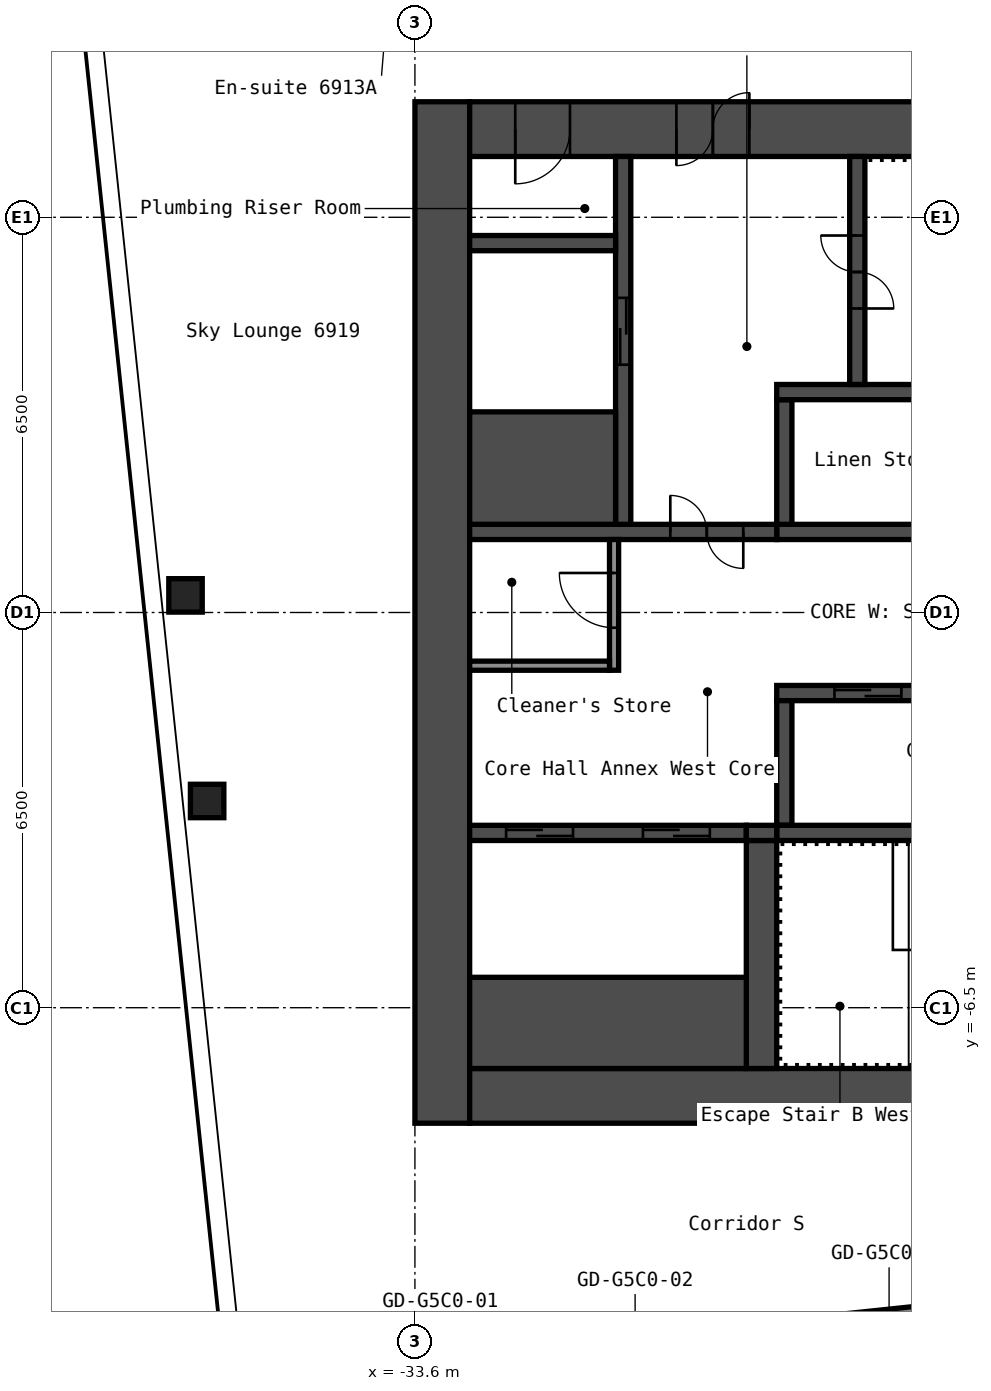
"""IFC4 building model, lengths in metres.
Left out: names, types, materials, properties, quantities, classifications, styles, units other than length and angle.
Written with IfcOpenShell. Run it as: python <this file> out.ifc"""

import sys

from ifc_helpers import new_model, si_unit, direction, frame, frame_2d, origin, origin_2d, place, context, subcontext, project, spatial, rectangle, hollow_rectangle, extrude, element, fill, save


model = new_model("IFC4")
c1 = context("Model", 3, precision=1e-05, world=origin(), true_north=direction((0.0, 1.0)))
c2 = subcontext(c1, "Body", "Model", "MODEL_VIEW")
j1 = project(units=[si_unit("LENGTHUNIT", "METRE"), si_unit("PLANEANGLEUNIT", "RADIAN")], contexts=[c1])
p1 = place(None, origin())
s1 = spatial("IfcSite", under=j1, at=p1, CompositionType="ELEMENT")
p2 = place(p1, origin())
s2 = spatial("IfcBuilding", under=s1, at=p2, CompositionType="ELEMENT")
p3 = place(p2, frame((0.0, 0.0, 245.4)))
s3 = spatial("IfcBuildingStorey", under=s2, at=p3, CompositionType="ELEMENT", Elevation=245.4)
for number, where, z_axis, x_axis in (
    (1, (-37.017, -3.1, 0.0), (0.0, 0.0, 1.0), (1.0, 0.0, 0.0)),
    (2, (-37.373, 0.281, 0.0), (0.0, 0.0, 1.0), (1.0, 0.0, 0.0)),
):
    element("IfcColumn", number, at=place(p3, frame(where, z_axis=z_axis, x_axis=x_axis)), inside=s3, PredefinedType="COLUMN", context=c2, shape_type="SweptSolid", body=[
        extrude(hollow_rectangle(XDim=0.55, YDim=0.55, WallThickness=0.022, InnerFilletRadius=0.033, OuterFilletRadius=0.055, at=origin_2d()), origin(), (0.0, 0.0, 1.0), 2.75),
    ])
p4 = place(p3, frame((-33.15, -8.4, 0.0), z_axis=(0.0, 0.0, 1.0), x_axis=(0.0, 1.0, 0.0)))
e3 = element("IfcWall", 3, at=p4, inside=s3, PredefinedType="SHEAR", context=c2, shape_type="SweptSolid", body=[
    extrude(rectangle(XDim=16.8, YDim=0.9, at=frame_2d((8.4, 0.0))), origin(), (0.0, 0.0, 1.0), 2.75),
])
p5 = place(p3, frame((-32.7, 7.95, 0.0), z_axis=(0.0, 0.0, 1.0), x_axis=(1.0, 0.0, 0.0)))
e4 = element("IfcWall", 4, at=p5, inside=s3, PredefinedType="SHEAR", context=c2, shape_type="SweptSolid", body=[
    extrude(rectangle(XDim=15.0, YDim=0.9, at=frame_2d((7.5, 0.0))), origin(), (0.0, 0.0, 1.0), 2.75),
])
p6 = place(p5, frame((3.4, 0.0, 0.0)))
e5 = element("IfcOpeningElement", 5, at=p6, cuts=e4, PredefinedType="OPENING", context=c2, shape_type="SweptSolid", body=[
    extrude(rectangle(XDim=1.2, YDim=2.1, at=frame_2d((0.6, 1.05))), frame((0.0, 0.46, 0.0), z_axis=(0.0, -1.0, 0.0), x_axis=(1.0, 0.0, 0.0)), (0.0, 0.0, 1.0), 0.92),
])
p7 = place(p5, frame((0.75, 0.0, 0.0)))
e6 = element("IfcOpeningElement", 6, at=p7, cuts=e4, PredefinedType="OPENING", context=c2, shape_type="SweptSolid", body=[
    extrude(rectangle(XDim=0.9, YDim=2.1, at=frame_2d((0.45, 1.05))), frame((0.0, 0.46, 0.0), z_axis=(0.0, -1.0, 0.0), x_axis=(1.0, 0.0, 0.0)), (0.0, 0.0, 1.0), 0.92),
])
p8 = place(p3, frame((-32.7, -7.95, 0.0), z_axis=(0.0, 0.0, 1.0), x_axis=(1.0, 0.0, 0.0)))
e7 = element("IfcWall", 7, at=p8, inside=s3, PredefinedType="SHEAR", context=c2, shape_type="SweptSolid", body=[
    extrude(rectangle(XDim=15.0, YDim=0.9, at=frame_2d((7.5, 0.0))), origin(), (0.0, 0.0, 1.0), 2.75),
])
p9 = place(p8, frame((11.45, 0.0, 0.0)))
e8 = element("IfcOpeningElement", 8, at=p9, cuts=e7, PredefinedType="OPENING", context=c2, shape_type="SweptSolid", body=[
    extrude(rectangle(XDim=1.0, YDim=2.1, at=frame_2d((0.5, 1.05))), frame((0.0, 0.46, 0.0), z_axis=(0.0, -1.0, 0.0), x_axis=(1.0, 0.0, 0.0)), (0.0, 0.0, 1.0), 0.92),
])
p10 = place(p3, frame((-27.65, 1.325, 0.0), z_axis=(0.0, 0.0, 1.0), x_axis=(1.0, 0.0, 0.0)))
e9 = element("IfcWall", 9, at=p10, inside=s3, PredefinedType="SHEAR", context=c2, shape_type="SweptSolid", body=[
    extrude(rectangle(XDim=7.5, YDim=0.25, at=frame_2d((3.75, 0.0))), origin(), (0.0, 0.0, 1.0), 2.75),
])
p11 = place(p10, frame((6.212, 0.0, 0.0)))
e10 = element("IfcOpeningElement", 10, at=p11, cuts=e9, PredefinedType="OPENING", context=c2, shape_type="SweptSolid", body=[
    extrude(rectangle(XDim=0.9, YDim=2.1, at=frame_2d((0.45, 1.05))), frame((0.0, 0.135, 0.0), z_axis=(0.0, -1.0, 0.0), x_axis=(1.0, 0.0, 0.0)), (0.0, 0.0, 1.0), 0.27),
])
p12 = place(p10, frame((2.512, 0.0, 0.0)))
e11 = element("IfcOpeningElement", 11, at=p12, cuts=e9, PredefinedType="OPENING", context=c2, shape_type="SweptSolid", body=[
    extrude(rectangle(XDim=0.9, YDim=2.1, at=frame_2d((0.45, 1.05))), frame((0.0, 0.135, 0.0), z_axis=(0.0, -1.0, 0.0), x_axis=(1.0, 0.0, 0.0)), (0.0, 0.0, 1.0), 0.27),
])
p13 = place(p3, frame((-27.525, 1.45, 0.0), z_axis=(0.0, 0.0, 1.0), x_axis=(0.0, 1.0, 0.0)))
e12 = element("IfcWall", 12, at=p13, inside=s3, PredefinedType="SHEAR", context=c2, shape_type="SweptSolid", body=[
    extrude(rectangle(XDim=2.05, YDim=0.25, at=frame_2d((1.025, 0.0))), origin(), (0.0, 0.0, 1.0), 2.75),
])
p14 = place(p3, frame((-27.65, 3.625, 0.0), z_axis=(0.0, 0.0, 1.0), x_axis=(1.0, 0.0, 0.0)))
e13 = element("IfcWall", 13, at=p14, inside=s3, PredefinedType="SHEAR", context=c2, shape_type="SweptSolid", body=[
    extrude(rectangle(XDim=7.5, YDim=0.25, at=frame_2d((3.75, 0.0))), origin(), (0.0, 0.0, 1.0), 2.75),
])
p15 = place(p3, frame((-26.325, 3.75, 0.0), z_axis=(0.0, 0.0, 1.0), x_axis=(0.0, 1.0, 0.0)))
e14 = element("IfcWall", 14, at=p15, inside=s3, PredefinedType="SHEAR", context=c2, shape_type="SweptSolid", body=[
    extrude(rectangle(XDim=3.75, YDim=0.25, at=frame_2d((1.875, 0.0))), origin(), (0.0, 0.0, 1.0), 2.75),
])
p16 = place(p15, frame((1.25, 0.0, 0.0)))
e15 = element("IfcOpeningElement", 15, at=p16, cuts=e14, PredefinedType="OPENING", context=c2, shape_type="SweptSolid", body=[
    extrude(rectangle(XDim=1.2, YDim=2.1, at=frame_2d((0.6, 1.05))), frame((0.0, 0.135, 0.0), z_axis=(0.0, -1.0, 0.0), x_axis=(1.0, 0.0, 0.0)), (0.0, 0.0, 1.0), 0.27),
])
p17 = place(p3, frame((-32.7, 1.325, 0.0), z_axis=(0.0, 0.0, 1.0), x_axis=(1.0, 0.0, 0.0)))
e16 = element("IfcWall", 16, at=p17, inside=s3, PredefinedType="SHEAR", context=c2, shape_type="SweptSolid", body=[
    extrude(rectangle(XDim=5.05, YDim=0.25, at=frame_2d((2.525, 0.0))), origin(), (0.0, 0.0, 1.0), 2.75),
])
p18 = place(p17, frame((3.3, 0.0, 0.0)))
e17 = element("IfcOpeningElement", 17, at=p18, cuts=e16, PredefinedType="OPENING", context=c2, shape_type="SweptSolid", body=[
    extrude(rectangle(XDim=1.2, YDim=2.1, at=frame_2d((0.6, 1.05))), frame((0.0, 0.135, 0.0), z_axis=(0.0, -1.0, 0.0), x_axis=(1.0, 0.0, 0.0)), (0.0, 0.0, 1.0), 0.27),
])
p19 = place(p3, frame((-30.175, 1.45, 0.0), z_axis=(0.0, 0.0, 1.0), x_axis=(0.0, 1.0, 0.0)))
e18 = element("IfcWall", 18, at=p19, inside=s3, PredefinedType="SHEAR", context=c2, shape_type="SweptSolid", body=[
    extrude(rectangle(XDim=6.05, YDim=0.25, at=frame_2d((3.025, 0.0))), origin(), (0.0, 0.0, 1.0), 2.75),
])
p20 = place(p19, frame((2.625, 0.0, 0.0)))
e19 = element("IfcOpeningElement", 19, at=p20, cuts=e18, PredefinedType="OPENING", context=c2, shape_type="SweptSolid", body=[
    extrude(rectangle(XDim=1.1, YDim=2.1, at=frame_2d((0.55, 1.05))), frame((0.0, 0.135, 0.0), z_axis=(0.0, -1.0, 0.0), x_axis=(1.0, 0.0, 0.0)), (0.0, 0.0, 1.0), 0.27),
])
p21 = place(p3, frame((-32.7, 2.375, 0.0), z_axis=(0.0, 0.0, 1.0), x_axis=(1.0, 0.0, 0.0)))
e20 = element("IfcWall", 20, at=p21, inside=s3, PredefinedType="SHEAR", context=c2, shape_type="SweptSolid", body=[
    extrude(rectangle(XDim=2.4, YDim=1.85, at=frame_2d((1.2, 0.0))), origin(), (0.0, 0.0, 1.0), 2.75),
])
p22 = place(p3, frame((-32.7, 6.075, 0.0), z_axis=(0.0, 0.0, 1.0), x_axis=(1.0, 0.0, 0.0)))
e21 = element("IfcWall", 21, at=p22, inside=s3, PredefinedType="SHEAR", context=c2, shape_type="SweptSolid", body=[
    extrude(rectangle(XDim=2.4, YDim=0.25, at=frame_2d((1.2, 0.0))), origin(), (0.0, 0.0, 1.0), 2.75),
])
p23 = place(p3, frame((-27.65, -1.325, 0.0), z_axis=(0.0, 0.0, 1.0), x_axis=(1.0, 0.0, 0.0)))
e22 = element("IfcWall", 22, at=p23, inside=s3, PredefinedType="SHEAR", context=c2, shape_type="SweptSolid", body=[
    extrude(rectangle(XDim=7.5, YDim=0.25, at=frame_2d((3.75, 0.0))), origin(), (0.0, 0.0, 1.0), 2.75),
])
p24 = place(p23, frame((5.75, 0.0, 0.0)))
e23 = element("IfcOpeningElement", 23, at=p24, cuts=e22, PredefinedType="OPENING", context=c2, shape_type="SweptSolid", body=[
    extrude(rectangle(XDim=1.1, YDim=2.1, at=frame_2d((0.55, 1.05))), frame((0.0, 0.135, 0.0), z_axis=(0.0, -1.0, 0.0), x_axis=(1.0, 0.0, 0.0)), (0.0, 0.0, 1.0), 0.27),
])
p25 = place(p23, frame((3.35, 0.0, 0.0)))
e24 = element("IfcOpeningElement", 24, at=p25, cuts=e22, PredefinedType="OPENING", context=c2, shape_type="SweptSolid", body=[
    extrude(rectangle(XDim=1.1, YDim=2.1, at=frame_2d((0.55, 1.05))), frame((0.0, 0.135, 0.0), z_axis=(0.0, -1.0, 0.0), x_axis=(1.0, 0.0, 0.0)), (0.0, 0.0, 1.0), 0.27),
])
p26 = place(p23, frame((0.95, 0.0, 0.0)))
e25 = element("IfcOpeningElement", 25, at=p26, cuts=e22, PredefinedType="OPENING", context=c2, shape_type="SweptSolid", body=[
    extrude(rectangle(XDim=1.1, YDim=2.1, at=frame_2d((0.55, 1.05))), frame((0.0, 0.135, 0.0), z_axis=(0.0, -1.0, 0.0), x_axis=(1.0, 0.0, 0.0)), (0.0, 0.0, 1.0), 0.27),
])
p27 = place(p3, frame((-27.525, -3.5, 0.0), z_axis=(0.0, 0.0, 1.0), x_axis=(0.0, 1.0, 0.0)))
e26 = element("IfcWall", 26, at=p27, inside=s3, PredefinedType="SHEAR", context=c2, shape_type="SweptSolid", body=[
    extrude(rectangle(XDim=2.05, YDim=0.25, at=frame_2d((1.025, 0.0))), origin(), (0.0, 0.0, 1.0), 2.75),
])
p28 = place(p3, frame((-27.65, -3.625, 0.0), z_axis=(0.0, 0.0, 1.0), x_axis=(1.0, 0.0, 0.0)))
e27 = element("IfcWall", 27, at=p28, inside=s3, PredefinedType="SHEAR", context=c2, shape_type="SweptSolid", body=[
    extrude(rectangle(XDim=7.5, YDim=0.25, at=frame_2d((3.75, 0.0))), origin(), (0.0, 0.0, 1.0), 2.75),
])
p29 = place(p3, frame((-27.9, -7.5, 0.0), z_axis=(0.0, 0.0, 1.0), x_axis=(0.0, 1.0, 0.0)))
e28 = element("IfcWall", 28, at=p29, inside=s3, PredefinedType="SHEAR", context=c2, shape_type="SweptSolid", body=[
    extrude(rectangle(XDim=3.75, YDim=0.5, at=frame_2d((1.875, 0.0))), origin(), (0.0, 0.0, 1.0), 2.75),
])
p30 = place(p3, frame((-32.7, -3.625, 0.0), z_axis=(0.0, 0.0, 1.0), x_axis=(1.0, 0.0, 0.0)))
e29 = element("IfcWall", 29, at=p30, inside=s3, PredefinedType="SHEAR", context=c2, shape_type="SweptSolid", body=[
    extrude(rectangle(XDim=4.55, YDim=0.25, at=frame_2d((2.275, 0.0))), origin(), (0.0, 0.0, 1.0), 2.75),
])
p31 = place(p30, frame((2.85, 0.0, 0.0)))
e30 = element("IfcOpeningElement", 30, at=p31, cuts=e29, PredefinedType="OPENING", context=c2, shape_type="SweptSolid", body=[
    extrude(rectangle(XDim=1.1, YDim=2.1, at=frame_2d((0.55, 1.05))), frame((0.0, 0.135, 0.0), z_axis=(0.0, -1.0, 0.0), x_axis=(1.0, 0.0, 0.0)), (0.0, 0.0, 1.0), 0.27),
])
p32 = place(p30, frame((0.6, 0.0, 0.0)))
e31 = element("IfcOpeningElement", 31, at=p32, cuts=e29, PredefinedType="OPENING", context=c2, shape_type="SweptSolid", body=[
    extrude(rectangle(XDim=1.1, YDim=2.1, at=frame_2d((0.55, 1.05))), frame((0.0, 0.135, 0.0), z_axis=(0.0, -1.0, 0.0), x_axis=(1.0, 0.0, 0.0)), (0.0, 0.0, 1.0), 0.27),
])
p33 = place(p3, frame((-32.7, -6.75, 0.0), z_axis=(0.0, 0.0, 1.0), x_axis=(1.0, 0.0, 0.0)))
e32 = element("IfcWall", 32, at=p33, inside=s3, PredefinedType="SHEAR", context=c2, shape_type="SweptSolid", body=[
    extrude(rectangle(XDim=4.55, YDim=1.5, at=frame_2d((2.275, 0.0))), origin(), (0.0, 0.0, 1.0), 2.75),
])
p34 = place(p3, frame((-28.15, -3.625, 0.0), z_axis=(0.0, 0.0, 1.0), x_axis=(1.0, 0.0, 0.0)))
e33 = element("IfcWall", 33, at=p34, inside=s3, PredefinedType="SHEAR", context=c2, shape_type="SweptSolid", body=[
    extrude(rectangle(XDim=0.5, YDim=0.25, at=frame_2d((0.25, 0.0))), origin(), (0.0, 0.0, 1.0), 2.75),
])
p35 = place(p3, frame((-30.325, -0.95, 0.0), z_axis=(0.0, 0.0, 1.0), x_axis=(0.0, 1.0, 0.0)))
e34 = element("IfcWall", 34, at=p35, inside=s3, PredefinedType="PARTITIONING", context=c2, shape_type="SweptSolid", body=[
    extrude(rectangle(XDim=2.15, YDim=0.15, at=frame_2d((1.075, 0.0))), origin(), (0.0, 0.0, 1.0), 2.75),
])
p36 = place(p35, frame((0.7, 0.0, 0.0)))
e35 = element("IfcOpeningElement", 35, at=p36, cuts=e34, PredefinedType="OPENING", context=c2, shape_type="SweptSolid", body=[
    extrude(rectangle(XDim=0.9, YDim=2.1, at=frame_2d((0.45, 1.05))), frame((0.0, 0.085, 0.0), z_axis=(0.0, -1.0, 0.0), x_axis=(1.0, 0.0, 0.0)), (0.0, 0.0, 1.0), 0.17),
])
p37 = place(p3, frame((-32.7, -0.875, 0.0), z_axis=(0.0, 0.0, 1.0), x_axis=(1.0, 0.0, 0.0)))
e36 = element("IfcWall", 36, at=p37, inside=s3, PredefinedType="PARTITIONING", context=c2, shape_type="SweptSolid", body=[
    extrude(rectangle(XDim=2.3, YDim=0.15, at=frame_2d((1.15, 0.0))), origin(), (0.0, 0.0, 1.0), 2.75),
])
p38 = place(p3, frame((-36.712, -12.705, 0.0), z_axis=(0.0, 0.0, 1.0), x_axis=(0.994522460242, 0.104523088709, 0.0)))
e37 = element("IfcWall", 37, at=p38, inside=s3, PredefinedType="PARTITIONING", context=c2, shape_type="SweptSolid", body=[
    extrude(rectangle(XDim=21.3, YDim=0.2, at=frame_2d((10.65, 0.0))), origin(), (0.0, 0.0, 1.0), 2.75),
])
p39 = place(p38, frame((3.05, 0.0, 0.0)))
e38 = element("IfcOpeningElement", 38, at=p39, cuts=e37, PredefinedType="OPENING", context=c2, shape_type="SweptSolid", body=[
    extrude(rectangle(XDim=1.0, YDim=2.1, at=frame_2d((0.5, 1.05))), frame((0.0, 0.11, 0.0), z_axis=(0.0, -1.0, 0.0), x_axis=(1.0, 0.0, 0.0)), (0.0, 0.0, 1.0), 0.22),
])
p40 = place(p38, frame((6.32, 0.0, 0.0)))
e39 = element("IfcOpeningElement", 39, at=p40, cuts=e37, PredefinedType="OPENING", context=c2, shape_type="SweptSolid", body=[
    extrude(rectangle(XDim=0.9, YDim=2.1, at=frame_2d((0.45, 1.05))), frame((0.0, 0.11, 0.0), z_axis=(0.0, -1.0, 0.0), x_axis=(1.0, 0.0, 0.0)), (0.0, 0.0, 1.0), 0.22),
])
p41 = place(p38, frame((10.52, 0.0, 0.0)))
e40 = element("IfcOpeningElement", 40, at=p41, cuts=e37, PredefinedType="OPENING", context=c2, shape_type="SweptSolid", body=[
    extrude(rectangle(XDim=0.9, YDim=2.1, at=frame_2d((0.45, 1.05))), frame((0.0, 0.11, 0.0), z_axis=(0.0, -1.0, 0.0), x_axis=(1.0, 0.0, 0.0)), (0.0, 0.0, 1.0), 0.22),
])
p42 = place(p38, frame((13.96, 0.0, 0.0)))
e41 = element("IfcOpeningElement", 41, at=p42, cuts=e37, PredefinedType="OPENING", context=c2, shape_type="SweptSolid", body=[
    extrude(rectangle(XDim=0.9, YDim=2.1, at=frame_2d((0.45, 1.05))), frame((0.0, 0.11, 0.0), z_axis=(0.0, -1.0, 0.0), x_axis=(1.0, 0.0, 0.0)), (0.0, 0.0, 1.0), 0.22),
])
p43 = place(p38, frame((18.16, 0.0, 0.0)))
e42 = element("IfcOpeningElement", 42, at=p43, cuts=e37, PredefinedType="OPENING", context=c2, shape_type="SweptSolid", body=[
    extrude(rectangle(XDim=0.9, YDim=2.1, at=frame_2d((0.45, 1.05))), frame((0.0, 0.11, 0.0), z_axis=(0.0, -1.0, 0.0), x_axis=(1.0, 0.0, 0.0)), (0.0, 0.0, 1.0), 0.22),
])
p44 = place(p6, origin())
e43 = element("IfcDoor", 43, at=p44, inside=s3, OperationType="DOUBLE_DOOR_SINGLE_SWING", PredefinedType="DOOR", context=c2, shape_type="SweptSolid", body=[
    extrude(rectangle(XDim=1.2, YDim=2.1, at=frame_2d((0.6, 1.05))), frame((0.0, 0.025, 0.0), z_axis=(0.0, -1.0, 0.0), x_axis=(1.0, 0.0, 0.0)), (0.0, 0.0, 1.0), 0.05),
])
fill(e5, e43)
p45 = place(p7, origin())
e44 = element("IfcDoor", 44, at=p45, inside=s3, OperationType="SINGLE_SWING_LEFT", PredefinedType="DOOR", context=c2, shape_type="SweptSolid", body=[
    extrude(rectangle(XDim=0.9, YDim=2.1, at=frame_2d((0.45, 1.05))), frame((0.0, 0.025, 0.0), z_axis=(0.0, -1.0, 0.0), x_axis=(1.0, 0.0, 0.0)), (0.0, 0.0, 1.0), 0.05),
])
fill(e6, e44)
p46 = place(p16, origin())
e45 = element("IfcDoor", 45, at=p46, inside=s3, OperationType="DOUBLE_DOOR_SINGLE_SWING", PredefinedType="DOOR", context=c2, shape_type="SweptSolid", body=[
    extrude(rectangle(XDim=1.2, YDim=2.1, at=frame_2d((0.6, 1.05))), frame((0.0, 0.025, 0.0), z_axis=(0.0, -1.0, 0.0), x_axis=(1.0, 0.0, 0.0)), (0.0, 0.0, 1.0), 0.05),
])
fill(e15, e45)
p47 = place(p18, origin())
e46 = element("IfcDoor", 46, at=p47, inside=s3, OperationType="DOUBLE_DOOR_SINGLE_SWING", PredefinedType="DOOR", context=c2, shape_type="SweptSolid", body=[
    extrude(rectangle(XDim=1.2, YDim=2.1, at=frame_2d((0.6, 1.05))), frame((0.0, 0.025, 0.0), z_axis=(0.0, -1.0, 0.0), x_axis=(1.0, 0.0, 0.0)), (0.0, 0.0, 1.0), 0.05),
])
fill(e17, e46)
p48 = place(p36, origin())
e47 = element("IfcDoor", 47, at=p48, inside=s3, OperationType="SINGLE_SWING_LEFT", PredefinedType="DOOR", context=c2, shape_type="SweptSolid", body=[
    extrude(rectangle(XDim=0.9, YDim=2.1, at=frame_2d((0.45, 1.05))), frame((0.0, 0.025, 0.0), z_axis=(0.0, -1.0, 0.0), x_axis=(1.0, 0.0, 0.0)), (0.0, 0.0, 1.0), 0.05),
])
fill(e35, e47)
p49 = place(p26, origin())
e48 = element("IfcDoor", 48, at=p49, inside=s3, OperationType="DOUBLE_DOOR_SLIDING", PredefinedType="DOOR", context=c2, shape_type="SweptSolid", body=[
    extrude(rectangle(XDim=1.1, YDim=2.1, at=frame_2d((0.55, 1.05))), frame((0.0, 0.025, 0.0), z_axis=(0.0, -1.0, 0.0), x_axis=(1.0, 0.0, 0.0)), (0.0, 0.0, 1.0), 0.05),
])
fill(e25, e48)
p50 = place(p20, origin())
e49 = element("IfcDoor", 49, at=p50, inside=s3, OperationType="DOUBLE_DOOR_SLIDING", PredefinedType="DOOR", context=c2, shape_type="SweptSolid", body=[
    extrude(rectangle(XDim=1.1, YDim=2.1, at=frame_2d((0.55, 1.05))), frame((0.0, 0.025, 0.0), z_axis=(0.0, -1.0, 0.0), x_axis=(1.0, 0.0, 0.0)), (0.0, 0.0, 1.0), 0.05),
])
fill(e19, e49)
p51 = place(p31, origin())
e50 = element("IfcDoor", 50, at=p51, inside=s3, OperationType="DOUBLE_DOOR_SLIDING", PredefinedType="DOOR", context=c2, shape_type="SweptSolid", body=[
    extrude(rectangle(XDim=1.1, YDim=2.1, at=frame_2d((0.55, 1.05))), frame((0.0, 0.025, 0.0), z_axis=(0.0, -1.0, 0.0), x_axis=(1.0, 0.0, 0.0)), (0.0, 0.0, 1.0), 0.05),
])
fill(e30, e50)
p52 = place(p32, origin())
e51 = element("IfcDoor", 51, at=p52, inside=s3, OperationType="DOUBLE_DOOR_SLIDING", PredefinedType="DOOR", context=c2, shape_type="SweptSolid", body=[
    extrude(rectangle(XDim=1.1, YDim=2.1, at=frame_2d((0.55, 1.05))), frame((0.0, 0.025, 0.0), z_axis=(0.0, -1.0, 0.0), x_axis=(1.0, 0.0, 0.0)), (0.0, 0.0, 1.0), 0.05),
])
fill(e31, e51)
save(model, sys.argv[1])
